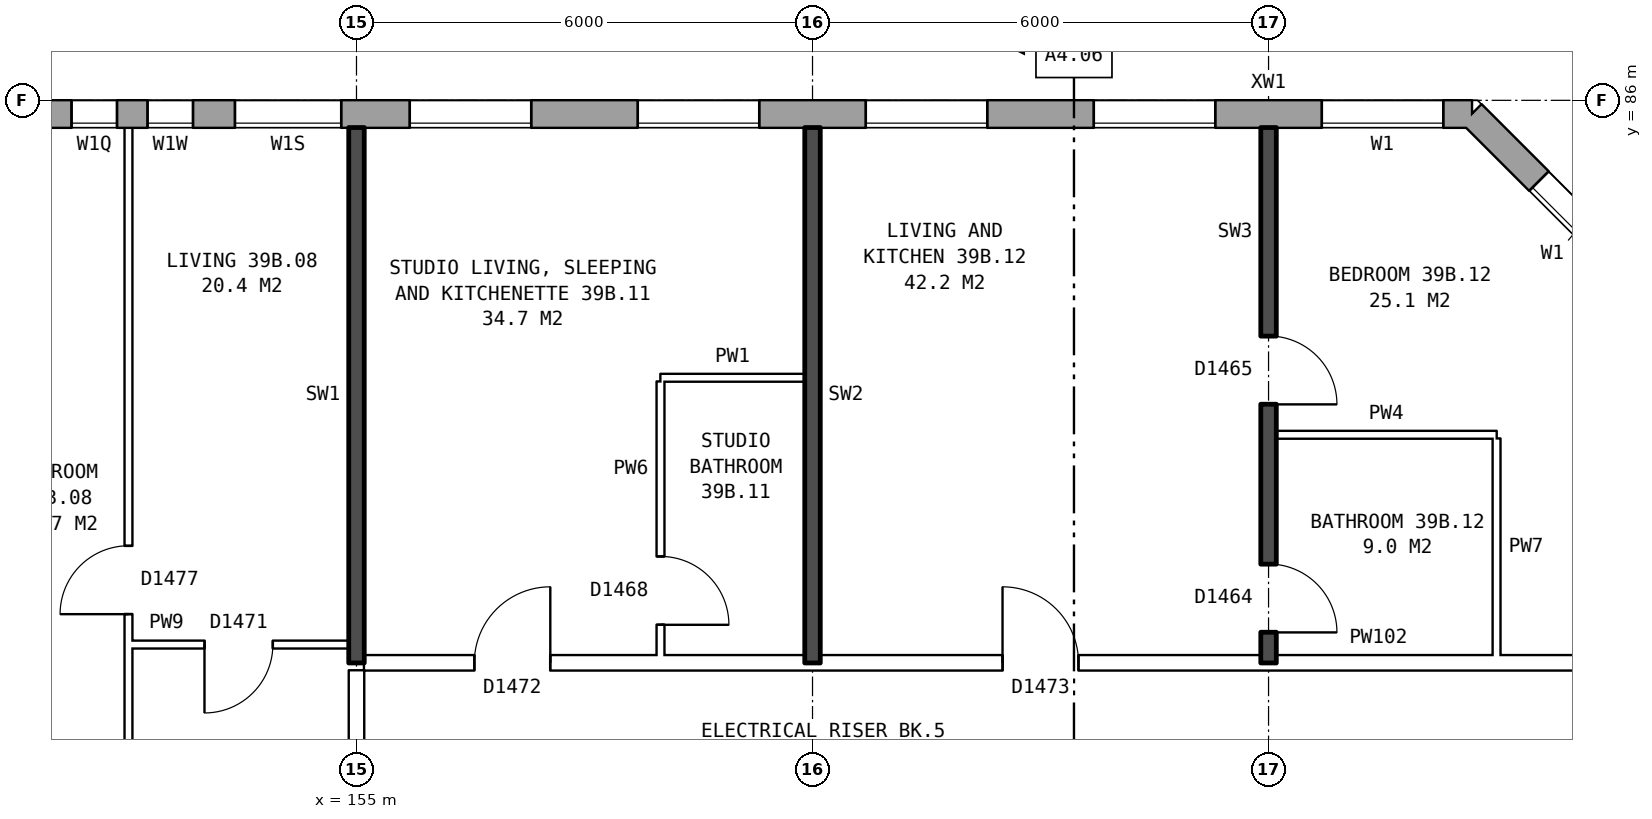
"""IFC4 building model, lengths in metres.
Left out: names, types, materials, properties, quantities, classifications, styles, units other than length and angle.
Written with IfcOpenShell. Run it as: python <this file> out.ifc"""

import sys

from ifc_helpers import new_model, si_unit, direction, frame, frame_2d, origin, place, context, subcontext, project, spatial, rectangle, extrude, element, fill, save


model = new_model("IFC4")
c1 = context("Model", 3, precision=1e-05, world=origin(), true_north=direction((0.0, 1.0)))
c2 = subcontext(c1, "Body", "Model", "MODEL_VIEW")
j1 = project(units=[si_unit("LENGTHUNIT", "METRE"), si_unit("PLANEANGLEUNIT", "RADIAN")], contexts=[c1])
p1 = place(None, origin())
s1 = spatial("IfcSite", under=j1, at=p1, CompositionType="ELEMENT")
p2 = place(p1, origin())
s2 = spatial("IfcBuilding", under=s1, at=p2, CompositionType="ELEMENT")
p3 = place(p2, frame((0.0, 0.0, 139.2)))
s3 = spatial("IfcBuildingStorey", under=s2, at=p3, CompositionType="ELEMENT", Elevation=139.2)
p4 = place(p3, frame((172.57, 82.925, 0.0), z_axis=(0.0, 0.0, 1.0), x_axis=(-0.707106781187, 0.707106781187, 0.0)))
e1 = element("IfcWall", 1, at=p4, inside=s3, PredefinedType="STANDARD", context=c2, shape_type="SweptSolid", body=[
    extrude(rectangle(XDim=4.094, YDim=0.36, at=frame_2d((2.047, 0.0))), origin(), (0.0, 0.0, 1.0), 2.85),
])
p5 = place(p4, frame((1.247, 0.0, 0.8)))
e2 = element("IfcOpeningElement", 2, at=p5, cuts=e1, PredefinedType="OPENING", context=c2, shape_type="SweptSolid", body=[
    extrude(rectangle(XDim=1.6, YDim=1.8, at=frame_2d((0.8, 0.9))), frame((0.0, 0.19, 0.0), z_axis=(0.0, -1.0, 0.0), x_axis=(1.0, 0.0, 0.0)), (0.0, 0.0, 1.0), 0.38),
])
p6 = place(p3, frame((169.675, 85.82, 0.0), z_axis=(0.0, 0.0, 1.0), x_axis=(-1.0, 0.0, 0.0)))
e3 = element("IfcWall", 3, at=p6, inside=s3, PredefinedType="STANDARD", context=c2, shape_type="SweptSolid", body=[
    extrude(rectangle(XDim=35.601, YDim=0.36, at=frame_2d((17.8, 0.0))), origin(), (0.0, 0.0, 1.0), 2.85),
])
p7 = place(p6, frame((0.375, 0.0, 0.8)))
e4 = element("IfcOpeningElement", 4, at=p7, cuts=e3, PredefinedType="OPENING", context=c2, shape_type="SweptSolid", body=[
    extrude(rectangle(XDim=1.6, YDim=1.8, at=frame_2d((0.8, 0.9))), frame((0.0, 0.19, 0.0), z_axis=(0.0, -1.0, 0.0), x_axis=(1.0, 0.0, 0.0)), (0.0, 0.0, 1.0), 0.38),
])
p8 = place(p6, frame((3.375, 0.0, 0.8)))
e5 = element("IfcOpeningElement", 5, at=p8, cuts=e3, PredefinedType="OPENING", context=c2, shape_type="SweptSolid", body=[
    extrude(rectangle(XDim=1.6, YDim=1.8, at=frame_2d((0.8, 0.9))), frame((0.0, 0.19, 0.0), z_axis=(0.0, -1.0, 0.0), x_axis=(1.0, 0.0, 0.0)), (0.0, 0.0, 1.0), 0.38),
])
p9 = place(p6, frame((6.375, 0.0, 0.8)))
e6 = element("IfcOpeningElement", 6, at=p9, cuts=e3, PredefinedType="OPENING", context=c2, shape_type="SweptSolid", body=[
    extrude(rectangle(XDim=1.6, YDim=1.8, at=frame_2d((0.8, 0.9))), frame((0.0, 0.19, 0.0), z_axis=(0.0, -1.0, 0.0), x_axis=(1.0, 0.0, 0.0)), (0.0, 0.0, 1.0), 0.38),
])
p10 = place(p6, frame((9.375, 0.0, 0.8)))
e7 = element("IfcOpeningElement", 7, at=p10, cuts=e3, PredefinedType="OPENING", context=c2, shape_type="SweptSolid", body=[
    extrude(rectangle(XDim=1.6, YDim=1.8, at=frame_2d((0.8, 0.9))), frame((0.0, 0.19, 0.0), z_axis=(0.0, -1.0, 0.0), x_axis=(1.0, 0.0, 0.0)), (0.0, 0.0, 1.0), 0.38),
])
p11 = place(p6, frame((12.375, 0.0, 0.8)))
e8 = element("IfcOpeningElement", 8, at=p11, cuts=e3, PredefinedType="OPENING", context=c2, shape_type="SweptSolid", body=[
    extrude(rectangle(XDim=1.6, YDim=1.8, at=frame_2d((0.8, 0.9))), frame((0.0, 0.19, 0.0), z_axis=(0.0, -1.0, 0.0), x_axis=(1.0, 0.0, 0.0)), (0.0, 0.0, 1.0), 0.38),
])
p12 = place(p6, frame((14.875, 0.0, 1.65)))
e9 = element("IfcOpeningElement", 9, at=p12, cuts=e3, PredefinedType="OPENING", context=c2, shape_type="SweptSolid", body=[
    extrude(rectangle(XDim=1.4, YDim=0.9, at=frame_2d((0.7, 0.45))), frame((0.0, 0.19, 0.0), z_axis=(0.0, -1.0, 0.0), x_axis=(1.0, 0.0, 0.0)), (0.0, 0.0, 1.0), 0.38),
])
p13 = place(p6, frame((17.825, 0.0, 0.25)))
e10 = element("IfcOpeningElement", 10, at=p13, cuts=e3, PredefinedType="OPENING", context=c2, shape_type="SweptSolid", body=[
    extrude(rectangle(XDim=0.6, YDim=1.2, at=frame_2d((0.3, 0.6))), frame((0.0, 0.19, 0.0), z_axis=(0.0, -1.0, 0.0), x_axis=(1.0, 0.0, 0.0)), (0.0, 0.0, 1.0), 0.38),
])
p14 = place(p6, frame((21.375, 0.0, 0.8)))
e11 = element("IfcOpeningElement", 11, at=p14, cuts=e3, PredefinedType="OPENING", context=c2, shape_type="SweptSolid", body=[
    extrude(rectangle(XDim=1.6, YDim=1.8, at=frame_2d((0.8, 0.9))), frame((0.0, 0.19, 0.0), z_axis=(0.0, -1.0, 0.0), x_axis=(1.0, 0.0, 0.0)), (0.0, 0.0, 1.0), 0.38),
])
p15 = place(p6, frame((24.375, 0.0, 0.8)))
e12 = element("IfcOpeningElement", 12, at=p15, cuts=e3, PredefinedType="OPENING", context=c2, shape_type="SweptSolid", body=[
    extrude(rectangle(XDim=1.6, YDim=1.8, at=frame_2d((0.8, 0.9))), frame((0.0, 0.19, 0.0), z_axis=(0.0, -1.0, 0.0), x_axis=(1.0, 0.0, 0.0)), (0.0, 0.0, 1.0), 0.38),
])
p16 = place(p6, frame((27.375, 0.0, 0.8)))
e13 = element("IfcOpeningElement", 13, at=p16, cuts=e3, PredefinedType="OPENING", context=c2, shape_type="SweptSolid", body=[
    extrude(rectangle(XDim=1.6, YDim=1.8, at=frame_2d((0.8, 0.9))), frame((0.0, 0.19, 0.0), z_axis=(0.0, -1.0, 0.0), x_axis=(1.0, 0.0, 0.0)), (0.0, 0.0, 1.0), 0.38),
])
p17 = place(p6, frame((30.375, 0.0, 0.8)))
e14 = element("IfcOpeningElement", 14, at=p17, cuts=e3, PredefinedType="OPENING", context=c2, shape_type="SweptSolid", body=[
    extrude(rectangle(XDim=1.6, YDim=1.8, at=frame_2d((0.8, 0.9))), frame((0.0, 0.19, 0.0), z_axis=(0.0, -1.0, 0.0), x_axis=(1.0, 0.0, 0.0)), (0.0, 0.0, 1.0), 0.38),
])
p18 = place(p6, frame((33.375, 0.0, 0.8)))
e15 = element("IfcOpeningElement", 15, at=p18, cuts=e3, PredefinedType="OPENING", context=c2, shape_type="SweptSolid", body=[
    extrude(rectangle(XDim=1.6, YDim=1.8, at=frame_2d((0.8, 0.9))), frame((0.0, 0.19, 0.0), z_axis=(0.0, -1.0, 0.0), x_axis=(1.0, 0.0, 0.0)), (0.0, 0.0, 1.0), 0.38),
])
p19 = place(p6, frame((16.825, 0.0, 0.15)))
e16 = element("IfcOpeningElement", 16, at=p19, cuts=e3, PredefinedType="OPENING", context=c2, shape_type="SweptSolid", body=[
    extrude(rectangle(XDim=0.6, YDim=0.9, at=frame_2d((0.3, 0.45))), frame((0.0, 0.19, 0.0), z_axis=(0.0, -1.0, 0.0), x_axis=(1.0, 0.0, 0.0)), (0.0, 0.0, 1.0), 0.38),
])
p20 = place(p6, frame((19.575, 0.0, 1.35)))
e17 = element("IfcOpeningElement", 17, at=p20, cuts=e3, PredefinedType="OPENING", context=c2, shape_type="SweptSolid", body=[
    extrude(rectangle(XDim=0.8, YDim=1.2, at=frame_2d((0.4, 0.6))), frame((0.0, 0.19, 0.0), z_axis=(0.0, -1.0, 0.0), x_axis=(1.0, 0.0, 0.0)), (0.0, 0.0, 1.0), 0.38),
])
p21 = place(p3, frame((155.1, 78.6, 0.0), z_axis=(0.0, 0.0, 1.0), x_axis=(1.0, 0.0, 0.0)))
e18 = element("IfcWall", 18, at=p21, inside=s3, PredefinedType="PARTITIONING", context=c2, shape_type="SweptSolid", body=[
    extrude(rectangle(XDim=17.29, YDim=0.2, at=frame_2d((8.645, 0.0))), origin(), (0.0, 0.0, 1.0), 2.85),
])
p22 = place(p21, frame((1.45, 0.0, 0.0)))
e19 = element("IfcOpeningElement", 19, at=p22, cuts=e18, PredefinedType="OPENING", context=c2, shape_type="SweptSolid", body=[
    extrude(rectangle(XDim=1.0, YDim=2.1, at=frame_2d((0.5, 1.05))), frame((0.0, 0.11, 0.0), z_axis=(0.0, -1.0, 0.0), x_axis=(1.0, 0.0, 0.0)), (0.0, 0.0, 1.0), 0.22),
])
p23 = place(p21, frame((8.4, 0.0, 0.0)))
e20 = element("IfcOpeningElement", 20, at=p23, cuts=e18, PredefinedType="OPENING", context=c2, shape_type="SweptSolid", body=[
    extrude(rectangle(XDim=1.0, YDim=2.1, at=frame_2d((0.5, 1.05))), frame((0.0, 0.11, 0.0), z_axis=(0.0, -1.0, 0.0), x_axis=(1.0, 0.0, 0.0)), (0.0, 0.0, 1.0), 0.22),
])
p24 = place(p3, frame((152.0, 78.84, 0.0), z_axis=(0.0, 0.0, 1.0), x_axis=(1.0, 0.0, 0.0)))
e21 = element("IfcWall", 21, at=p24, inside=s3, PredefinedType="PARTITIONING", context=c2, shape_type="SweptSolid", body=[
    extrude(rectangle(XDim=2.9, YDim=0.1, at=frame_2d((1.45, 0.0))), origin(), (0.0, 0.0, 1.0), 2.85),
])
p25 = place(p24, frame((1.0, 0.0, 0.0)))
e22 = element("IfcOpeningElement", 22, at=p25, cuts=e21, PredefinedType="OPENING", context=c2, shape_type="SweptSolid", body=[
    extrude(rectangle(XDim=0.9, YDim=2.1, at=frame_2d((0.45, 1.05))), frame((0.0, 0.06, 0.0), z_axis=(0.0, -1.0, 0.0), x_axis=(1.0, 0.0, 0.0)), (0.0, 0.0, 1.0), 0.12),
])
p26 = place(p3, frame((167.1, 81.6, 0.0), z_axis=(0.0, 0.0, 1.0), x_axis=(1.0, 0.0, 0.0)))
e23 = element("IfcWall", 23, at=p26, inside=s3, PredefinedType="PARTITIONING", context=c2, shape_type="SweptSolid", body=[
    extrude(rectangle(XDim=2.9, YDim=0.1, at=frame_2d((1.45, 0.0))), origin(), (0.0, 0.0, 1.0), 2.85),
])
p27 = place(p3, frame((159.0, 82.35, 0.0), z_axis=(0.0, 0.0, 1.0), x_axis=(1.0, 0.0, 0.0)))
e24 = element("IfcWall", 24, at=p27, inside=s3, PredefinedType="PARTITIONING", context=c2, shape_type="SweptSolid", body=[
    extrude(rectangle(XDim=1.9, YDim=0.1, at=frame_2d((0.95, 0.0))), origin(), (0.0, 0.0, 1.0), 2.85),
])
p28 = place(p3, frame((152.0, 71.3, 0.0), z_axis=(0.0, 0.0, 1.0), x_axis=(0.0, 1.0, 0.0)))
e25 = element("IfcWall", 25, at=p28, inside=s3, PredefinedType="PARTITIONING", context=c2, shape_type="SweptSolid", body=[
    extrude(rectangle(XDim=14.34, YDim=0.1, at=frame_2d((7.17, 0.0))), origin(), (0.0, 0.0, 1.0), 2.85),
])
p29 = place(p28, frame((7.94, 0.0, 0.0)))
e26 = element("IfcOpeningElement", 26, at=p29, cuts=e25, PredefinedType="OPENING", context=c2, shape_type="SweptSolid", body=[
    extrude(rectangle(XDim=0.9, YDim=2.1, at=frame_2d((0.45, 1.05))), frame((0.0, 0.06, 0.0), z_axis=(0.0, -1.0, 0.0), x_axis=(1.0, 0.0, 0.0)), (0.0, 0.0, 1.0), 0.12),
])
p30 = place(p28, frame((0.4, 0.0, 0.0)))
e27 = element("IfcOpeningElement", 27, at=p30, cuts=e25, PredefinedType="OPENING", context=c2, shape_type="SweptSolid", body=[
    extrude(rectangle(XDim=0.9, YDim=2.1, at=frame_2d((0.45, 1.05))), frame((0.0, 0.06, 0.0), z_axis=(0.0, -1.0, 0.0), x_axis=(1.0, 0.0, 0.0)), (0.0, 0.0, 1.0), 0.12),
])
p31 = place(p3, frame((155.0, 76.3, 0.0), z_axis=(0.0, 0.0, 1.0), x_axis=(0.0, 1.0, 0.0)))
e28 = element("IfcWall", 28, at=p31, inside=s3, PredefinedType="PARTITIONING", context=c2, shape_type="SweptSolid", body=[
    extrude(rectangle(XDim=2.2, YDim=0.2, at=frame_2d((1.1, 0.0))), origin(), (0.0, 0.0, 1.0), 2.85),
])
p32 = place(p3, frame((155.0, 78.6, 0.0), z_axis=(0.0, 0.0, 1.0), x_axis=(0.0, 1.0, 0.0)))
e29 = element("IfcWall", 29, at=p32, inside=s3, PredefinedType="SOLIDWALL", context=c2, shape_type="SweptSolid", body=[
    extrude(rectangle(XDim=7.04, YDim=0.2, at=frame_2d((3.52, 0.0))), origin(), (0.0, 0.0, 1.0), 2.85),
])
p33 = place(p3, frame((159.0, 78.7, 0.0), z_axis=(0.0, 0.0, 1.0), x_axis=(0.0, 1.0, 0.0)))
e30 = element("IfcWall", 30, at=p33, inside=s3, PredefinedType="PARTITIONING", context=c2, shape_type="SweptSolid", body=[
    extrude(rectangle(XDim=3.6, YDim=0.1, at=frame_2d((1.8, 0.0))), origin(), (0.0, 0.0, 1.0), 2.85),
])
p34 = place(p33, frame((0.4, 0.0, 0.0)))
e31 = element("IfcOpeningElement", 31, at=p34, cuts=e30, PredefinedType="OPENING", context=c2, shape_type="SweptSolid", body=[
    extrude(rectangle(XDim=0.9, YDim=2.1, at=frame_2d((0.45, 1.05))), frame((0.0, 0.06, 0.0), z_axis=(0.0, -1.0, 0.0), x_axis=(1.0, 0.0, 0.0)), (0.0, 0.0, 1.0), 0.12),
])
p35 = place(p3, frame((161.0, 78.6, 0.0), z_axis=(0.0, 0.0, 1.0), x_axis=(0.0, 1.0, 0.0)))
e32 = element("IfcWall", 32, at=p35, inside=s3, PredefinedType="SOLIDWALL", context=c2, shape_type="SweptSolid", body=[
    extrude(rectangle(XDim=7.04, YDim=0.2, at=frame_2d((3.52, 0.0))), origin(), (0.0, 0.0, 1.0), 2.85),
])
p36 = place(p3, frame((167.0, 78.6, 0.0), z_axis=(0.0, 0.0, 1.0), x_axis=(0.0, 1.0, 0.0)))
e33 = element("IfcWall", 33, at=p36, inside=s3, PredefinedType="SOLIDWALL", context=c2, shape_type="SweptSolid", body=[
    extrude(rectangle(XDim=7.04, YDim=0.2, at=frame_2d((3.52, 0.0))), origin(), (0.0, 0.0, 1.0), 2.85),
])
p37 = place(p36, frame((3.4, 0.0, 0.0)))
e34 = element("IfcOpeningElement", 34, at=p37, cuts=e33, PredefinedType="OPENING", context=c2, shape_type="SweptSolid", body=[
    extrude(rectangle(XDim=0.9, YDim=2.1, at=frame_2d((0.45, 1.05))), frame((0.0, 0.11, 0.0), z_axis=(0.0, -1.0, 0.0), x_axis=(1.0, 0.0, 0.0)), (0.0, 0.0, 1.0), 0.22),
])
p38 = place(p36, frame((0.4, 0.0, 0.0)))
e35 = element("IfcOpeningElement", 35, at=p38, cuts=e33, PredefinedType="OPENING", context=c2, shape_type="SweptSolid", body=[
    extrude(rectangle(XDim=0.9, YDim=2.1, at=frame_2d((0.45, 1.05))), frame((0.0, 0.11, 0.0), z_axis=(0.0, -1.0, 0.0), x_axis=(1.0, 0.0, 0.0)), (0.0, 0.0, 1.0), 0.22),
])
p39 = place(p3, frame((170.0, 78.7, 0.0), z_axis=(0.0, 0.0, 1.0), x_axis=(0.0, 1.0, 0.0)))
e36 = element("IfcWall", 36, at=p39, inside=s3, PredefinedType="PARTITIONING", context=c2, shape_type="SweptSolid", body=[
    extrude(rectangle(XDim=2.85, YDim=0.1, at=frame_2d((1.425, 0.0))), origin(), (0.0, 0.0, 1.0), 2.85),
])
p40 = place(p5, origin())
e37 = element("IfcWindow", 37, at=p40, inside=s3, PartitioningType="SINGLE_PANEL", PredefinedType="WINDOW", context=c2, shape_type="SweptSolid", body=[
    extrude(rectangle(XDim=1.6, YDim=1.8, at=frame_2d((0.8, 0.9))), frame((0.0, 0.15, 0.0), z_axis=(0.0, -1.0, 0.0), x_axis=(1.0, 0.0, 0.0)), (0.0, 0.0, 1.0), 0.06),
])
fill(e2, e37)
p41 = place(p7, origin())
e38 = element("IfcWindow", 38, at=p41, inside=s3, PartitioningType="SINGLE_PANEL", PredefinedType="WINDOW", context=c2, shape_type="SweptSolid", body=[
    extrude(rectangle(XDim=1.6, YDim=1.8, at=frame_2d((0.8, 0.9))), frame((0.0, 0.15, 0.0), z_axis=(0.0, -1.0, 0.0), x_axis=(1.0, 0.0, 0.0)), (0.0, 0.0, 1.0), 0.06),
])
fill(e4, e38)
p42 = place(p8, origin())
e39 = element("IfcWindow", 39, at=p42, inside=s3, PartitioningType="SINGLE_PANEL", PredefinedType="WINDOW", context=c2, shape_type="SweptSolid", body=[
    extrude(rectangle(XDim=1.6, YDim=1.8, at=frame_2d((0.8, 0.9))), frame((0.0, 0.15, 0.0), z_axis=(0.0, -1.0, 0.0), x_axis=(1.0, 0.0, 0.0)), (0.0, 0.0, 1.0), 0.06),
])
fill(e5, e39)
p43 = place(p9, origin())
e40 = element("IfcWindow", 40, at=p43, inside=s3, PartitioningType="SINGLE_PANEL", PredefinedType="WINDOW", context=c2, shape_type="SweptSolid", body=[
    extrude(rectangle(XDim=1.6, YDim=1.8, at=frame_2d((0.8, 0.9))), frame((0.0, 0.15, 0.0), z_axis=(0.0, -1.0, 0.0), x_axis=(1.0, 0.0, 0.0)), (0.0, 0.0, 1.0), 0.06),
])
fill(e6, e40)
p44 = place(p10, origin())
e41 = element("IfcWindow", 41, at=p44, inside=s3, PartitioningType="SINGLE_PANEL", PredefinedType="WINDOW", context=c2, shape_type="SweptSolid", body=[
    extrude(rectangle(XDim=1.6, YDim=1.8, at=frame_2d((0.8, 0.9))), frame((0.0, 0.15, 0.0), z_axis=(0.0, -1.0, 0.0), x_axis=(1.0, 0.0, 0.0)), (0.0, 0.0, 1.0), 0.06),
])
fill(e7, e41)
p45 = place(p11, origin())
e42 = element("IfcWindow", 42, at=p45, inside=s3, PartitioningType="SINGLE_PANEL", PredefinedType="WINDOW", context=c2, shape_type="SweptSolid", body=[
    extrude(rectangle(XDim=1.6, YDim=1.8, at=frame_2d((0.8, 0.9))), frame((0.0, 0.15, 0.0), z_axis=(0.0, -1.0, 0.0), x_axis=(1.0, 0.0, 0.0)), (0.0, 0.0, 1.0), 0.06),
])
fill(e8, e42)
p46 = place(p12, origin())
e43 = element("IfcWindow", 43, at=p46, inside=s3, PartitioningType="SINGLE_PANEL", PredefinedType="WINDOW", context=c2, shape_type="SweptSolid", body=[
    extrude(rectangle(XDim=1.4, YDim=0.9, at=frame_2d((0.7, 0.45))), frame((0.0, 0.15, 0.0), z_axis=(0.0, -1.0, 0.0), x_axis=(1.0, 0.0, 0.0)), (0.0, 0.0, 1.0), 0.06),
])
fill(e9, e43)
p47 = place(p13, origin())
e44 = element("IfcWindow", 44, at=p47, inside=s3, PartitioningType="SINGLE_PANEL", PredefinedType="WINDOW", context=c2, shape_type="SweptSolid", body=[
    extrude(rectangle(XDim=0.6, YDim=1.2, at=frame_2d((0.3, 0.6))), frame((0.0, 0.15, 0.0), z_axis=(0.0, -1.0, 0.0), x_axis=(1.0, 0.0, 0.0)), (0.0, 0.0, 1.0), 0.06),
])
fill(e10, e44)
p48 = place(p29, origin())
e45 = element("IfcDoor", 45, at=p48, inside=s3, OperationType="SINGLE_SWING_LEFT", PredefinedType="DOOR", context=c2, shape_type="SweptSolid", body=[
    extrude(rectangle(XDim=0.9, YDim=2.1, at=frame_2d((0.45, 1.05))), frame((0.0, 0.025, 0.0), z_axis=(0.0, -1.0, 0.0), x_axis=(1.0, 0.0, 0.0)), (0.0, 0.0, 1.0), 0.05),
])
fill(e26, e45)
p49 = place(p25, frame((0.9, 0.0, 0.0), z_axis=(0.0, 0.0, 1.0), x_axis=(-1.0, 0.0, 0.0)))
e46 = element("IfcDoor", 46, at=p49, inside=s3, OperationType="SINGLE_SWING_RIGHT", PredefinedType="DOOR", context=c2, shape_type="SweptSolid", body=[
    extrude(rectangle(XDim=0.9, YDim=2.1, at=frame_2d((0.45, 1.05))), frame((0.0, 0.025, 0.0), z_axis=(0.0, -1.0, 0.0), x_axis=(1.0, 0.0, 0.0)), (0.0, 0.0, 1.0), 0.05),
])
fill(e22, e46)
p50 = place(p22, origin())
e47 = element("IfcDoor", 47, at=p50, inside=s3, OperationType="SINGLE_SWING_RIGHT", PredefinedType="DOOR", context=c2, shape_type="SweptSolid", body=[
    extrude(rectangle(XDim=1.0, YDim=2.1, at=frame_2d((0.5, 1.05))), frame((0.0, 0.025, 0.0), z_axis=(0.0, -1.0, 0.0), x_axis=(1.0, 0.0, 0.0)), (0.0, 0.0, 1.0), 0.05),
])
fill(e19, e47)
p51 = place(p34, frame((0.9, 0.0, 0.0), z_axis=(0.0, 0.0, 1.0), x_axis=(-1.0, 0.0, 0.0)))
e48 = element("IfcDoor", 48, at=p51, inside=s3, OperationType="SINGLE_SWING_RIGHT", PredefinedType="DOOR", context=c2, shape_type="SweptSolid", body=[
    extrude(rectangle(XDim=0.9, YDim=2.1, at=frame_2d((0.45, 1.05))), frame((0.0, 0.025, 0.0), z_axis=(0.0, -1.0, 0.0), x_axis=(1.0, 0.0, 0.0)), (0.0, 0.0, 1.0), 0.05),
])
fill(e31, e48)
p52 = place(p37, frame((0.9, 0.0, 0.0), z_axis=(0.0, 0.0, 1.0), x_axis=(-1.0, 0.0, 0.0)))
e49 = element("IfcDoor", 49, at=p52, inside=s3, OperationType="SINGLE_SWING_RIGHT", PredefinedType="DOOR", context=c2, shape_type="SweptSolid", body=[
    extrude(rectangle(XDim=0.9, YDim=2.1, at=frame_2d((0.45, 1.05))), frame((0.0, 0.025, 0.0), z_axis=(0.0, -1.0, 0.0), x_axis=(1.0, 0.0, 0.0)), (0.0, 0.0, 1.0), 0.05),
])
fill(e34, e49)
p53 = place(p23, origin())
e50 = element("IfcDoor", 50, at=p53, inside=s3, OperationType="SINGLE_SWING_LEFT", PredefinedType="DOOR", context=c2, shape_type="SweptSolid", body=[
    extrude(rectangle(XDim=1.0, YDim=2.1, at=frame_2d((0.5, 1.05))), frame((0.0, 0.025, 0.0), z_axis=(0.0, -1.0, 0.0), x_axis=(1.0, 0.0, 0.0)), (0.0, 0.0, 1.0), 0.05),
])
fill(e20, e50)
p54 = place(p38, frame((0.9, 0.0, 0.0), z_axis=(0.0, 0.0, 1.0), x_axis=(-1.0, 0.0, 0.0)))
e51 = element("IfcDoor", 51, at=p54, inside=s3, OperationType="SINGLE_SWING_RIGHT", PredefinedType="DOOR", context=c2, shape_type="SweptSolid", body=[
    extrude(rectangle(XDim=0.9, YDim=2.1, at=frame_2d((0.45, 1.05))), frame((0.0, 0.025, 0.0), z_axis=(0.0, -1.0, 0.0), x_axis=(1.0, 0.0, 0.0)), (0.0, 0.0, 1.0), 0.05),
])
fill(e35, e51)
p55 = place(p19, origin())
e52 = element("IfcWindow", 52, at=p55, inside=s3, PartitioningType="SINGLE_PANEL", PredefinedType="WINDOW", context=c2, shape_type="SweptSolid", body=[
    extrude(rectangle(XDim=0.6, YDim=0.9, at=frame_2d((0.3, 0.45))), frame((0.0, 0.15, 0.0), z_axis=(0.0, -1.0, 0.0), x_axis=(1.0, 0.0, 0.0)), (0.0, 0.0, 1.0), 0.06),
])
fill(e16, e52)
save(model, sys.argv[1])
